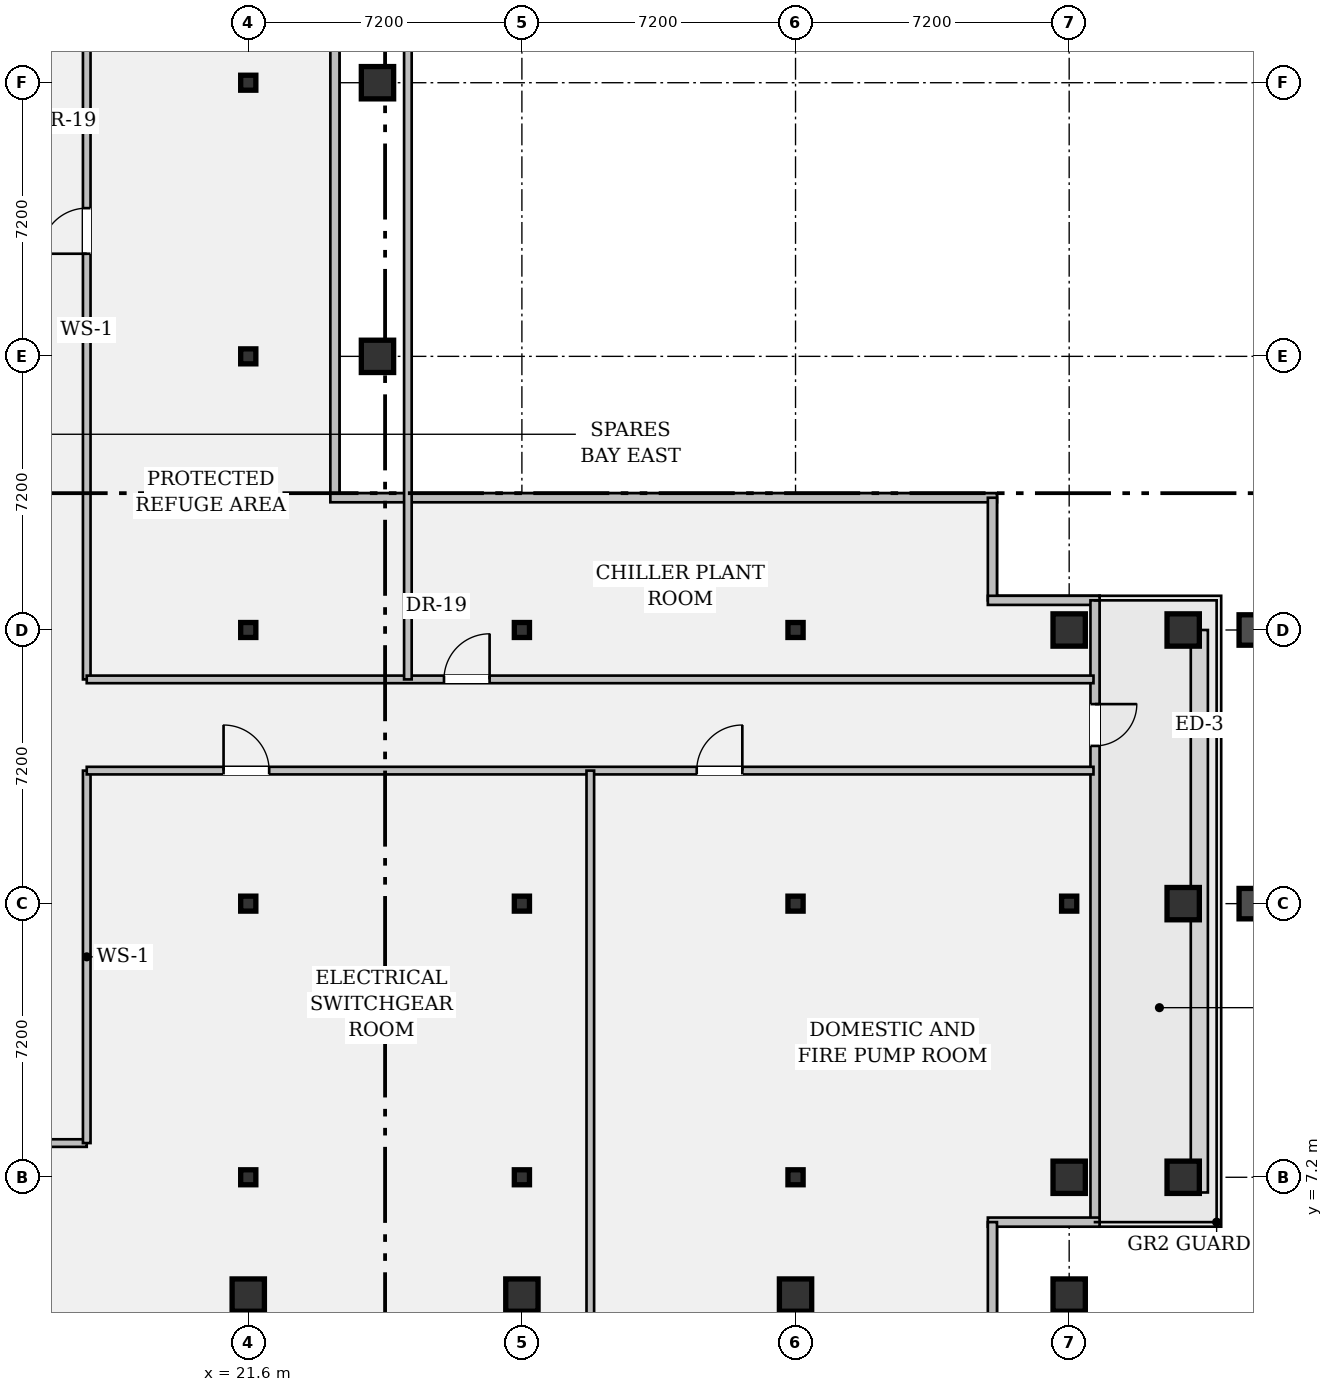
"""IFC4 building model, lengths in metres.
Left out: names, types, materials, properties, quantities, classifications, styles, units other than length and angle.
Written with IfcOpenShell. Run it as: python <this file> out.ifc"""

import sys

from ifc_helpers import new_model, si_unit, direction, frame, frame_2d, origin, origin_2d, place, context, subcontext, project, spatial, rectangle, hollow_rectangle, i_section, extrude, element, fill, save


model = new_model("IFC4")
c1 = context("Model", 3, precision=1e-05, world=origin(), true_north=direction((0.0, 1.0)))
c2 = subcontext(c1, "Body", "Model", "MODEL_VIEW")
j1 = project(units=[si_unit("LENGTHUNIT", "METRE"), si_unit("PLANEANGLEUNIT", "RADIAN")], contexts=[c1])
p1 = place(None, origin())
s1 = spatial("IfcSite", under=j1, at=p1, CompositionType="ELEMENT")
p2 = place(p1, origin())
s2 = spatial("IfcBuilding", under=s1, at=p2, CompositionType="ELEMENT")
p3 = place(p2, frame((0.0, 0.0, 163.8)))
s3 = spatial("IfcBuildingStorey", under=s2, at=p3, CompositionType="ELEMENT", Elevation=163.8)
p4 = place(p3, frame((21.6, 4.1, 0.0), z_axis=(0.0, 0.0, 1.0), x_axis=(1.0, 0.0, 0.0)))
e1 = element("IfcColumn", 1, at=p4, inside=s3, PredefinedType="COLUMN", context=c2, shape_type="SweptSolid", body=[
    extrude(hollow_rectangle(XDim=0.85, YDim=0.85, WallThickness=0.05, at=origin_2d()), origin(), (0.0, 0.0, 1.0), 4.6),
])
for number, where, z_axis, x_axis in (
    (2, (21.6, 7.2, 0.0), (0.0, 0.0, 1.0), (1.0, 0.0, 0.0)),
    (3, (21.6, 14.4, 0.0), (0.0, 0.0, 1.0), (1.0, 0.0, 0.0)),
    (4, (21.6, 21.6, 0.0), (0.0, 0.0, 1.0), (1.0, 0.0, 0.0)),
    (5, (21.6, 28.8, 0.0), (0.0, 0.0, 1.0), (1.0, 0.0, 0.0)),
    (6, (21.6, 36.0, 0.0), (0.0, 0.0, 1.0), (1.0, 0.0, 0.0)),
):
    element("IfcColumn", number, at=place(p3, frame(where, z_axis=z_axis, x_axis=x_axis)), inside=s3, PredefinedType="COLUMN", context=c2, shape_type="SweptSolid", body=[
        extrude(i_section(OverallWidth=0.399, OverallDepth=0.394, WebThickness=0.023, FlangeThickness=0.037, FilletRadius=0.018, at=origin_2d()), origin(), (0.0, 0.0, 1.0), 4.6),
    ])
for number, where, z_axis, x_axis in (
    (7, (25.0, 28.8, 0.0), (0.0, 0.0, 1.0), (1.0, 0.0, 0.0)),
    (8, (25.0, 36.0, 0.0), (0.0, 0.0, 1.0), (1.0, 0.0, 0.0)),
    (9, (28.8, 4.1, 0.0), (0.0, 0.0, 1.0), (1.0, 0.0, 0.0)),
):
    element("IfcColumn", number, at=place(p3, frame(where, z_axis=z_axis, x_axis=x_axis)), inside=s3, PredefinedType="COLUMN", context=c2, shape_type="SweptSolid", body=[
        extrude(hollow_rectangle(XDim=0.85, YDim=0.85, WallThickness=0.05, at=origin_2d()), origin(), (0.0, 0.0, 1.0), 4.6),
    ])
for number, where, z_axis, x_axis in (
    (10, (28.8, 7.2, 0.0), (0.0, 0.0, 1.0), (1.0, 0.0, 0.0)),
    (11, (28.8, 14.4, 0.0), (0.0, 0.0, 1.0), (1.0, 0.0, 0.0)),
    (12, (28.8, 21.6, 0.0), (0.0, 0.0, 1.0), (1.0, 0.0, 0.0)),
):
    element("IfcColumn", number, at=place(p3, frame(where, z_axis=z_axis, x_axis=x_axis)), inside=s3, PredefinedType="COLUMN", context=c2, shape_type="SweptSolid", body=[
        extrude(i_section(OverallWidth=0.399, OverallDepth=0.394, WebThickness=0.023, FlangeThickness=0.037, FilletRadius=0.018, at=origin_2d()), origin(), (0.0, 0.0, 1.0), 4.6),
    ])
p5 = place(p3, frame((36.0, 4.1, 0.0), z_axis=(0.0, 0.0, 1.0), x_axis=(1.0, 0.0, 0.0)))
e13 = element("IfcColumn", 13, at=p5, inside=s3, PredefinedType="COLUMN", context=c2, shape_type="SweptSolid", body=[
    extrude(hollow_rectangle(XDim=0.85, YDim=0.85, WallThickness=0.05, at=origin_2d()), origin(), (0.0, 0.0, 1.0), 4.6),
])
for number, where, z_axis, x_axis in (
    (14, (36.0, 7.2, 0.0), (0.0, 0.0, 1.0), (1.0, 0.0, 0.0)),
    (15, (36.0, 14.4, 0.0), (0.0, 0.0, 1.0), (1.0, 0.0, 0.0)),
    (16, (36.0, 21.6, 0.0), (0.0, 0.0, 1.0), (1.0, 0.0, 0.0)),
):
    element("IfcColumn", number, at=place(p3, frame(where, z_axis=z_axis, x_axis=x_axis)), inside=s3, PredefinedType="COLUMN", context=c2, shape_type="SweptSolid", body=[
        extrude(i_section(OverallWidth=0.399, OverallDepth=0.394, WebThickness=0.023, FlangeThickness=0.037, FilletRadius=0.018, at=origin_2d()), origin(), (0.0, 0.0, 1.0), 4.6),
    ])
for number, where, z_axis, x_axis in (
    (17, (43.2, 4.1, 0.0), (0.0, 0.0, 1.0), (1.0, 0.0, 0.0)),
    (18, (43.2, 7.2, 0.0), (0.0, 0.0, 1.0), (1.0, 0.0, 0.0)),
):
    element("IfcColumn", number, at=place(p3, frame(where, z_axis=z_axis, x_axis=x_axis)), inside=s3, PredefinedType="COLUMN", context=c2, shape_type="SweptSolid", body=[
        extrude(hollow_rectangle(XDim=0.85, YDim=0.85, WallThickness=0.05, at=origin_2d()), origin(), (0.0, 0.0, 1.0), 4.6),
    ])
p6 = place(p3, frame((43.2, 14.4, 0.0), z_axis=(0.0, 0.0, 1.0), x_axis=(1.0, 0.0, 0.0)))
e19 = element("IfcColumn", 19, at=p6, inside=s3, PredefinedType="COLUMN", context=c2, shape_type="SweptSolid", body=[
    extrude(i_section(OverallWidth=0.399, OverallDepth=0.394, WebThickness=0.023, FlangeThickness=0.037, FilletRadius=0.018, at=origin_2d()), origin(), (0.0, 0.0, 1.0), 4.6),
])
for number, where, z_axis, x_axis in (
    (20, (43.2, 21.6, 0.0), (0.0, 0.0, 1.0), (1.0, 0.0, 0.0)),
    (21, (46.2, 7.2, 0.0), (0.0, 0.0, 1.0), (1.0, 0.0, 0.0)),
    (22, (46.2, 14.4, 0.0), (0.0, 0.0, 1.0), (1.0, 0.0, 0.0)),
    (23, (46.2, 21.6, 0.0), (0.0, 0.0, 1.0), (1.0, 0.0, 0.0)),
):
    element("IfcColumn", number, at=place(p3, frame(where, z_axis=z_axis, x_axis=x_axis)), inside=s3, PredefinedType="COLUMN", context=c2, shape_type="SweptSolid", body=[
        extrude(hollow_rectangle(XDim=0.85, YDim=0.85, WallThickness=0.05, at=origin_2d()), origin(), (0.0, 0.0, 1.0), 4.6),
    ])
for number, where, z_axis, x_axis in (
    (24, (48.07, 14.4, -0.265), (0.209, 0.0, 0.978), (0.0, 1.0, 0.0)),
    (25, (48.07, 21.6, -0.265), (0.209, 0.0, 0.978), (0.0, 1.0, 0.0)),
):
    element("IfcColumn", number, at=place(p3, frame(where, z_axis=z_axis, x_axis=x_axis)), inside=s3, PredefinedType="COLUMN", context=c2, shape_type="SweptSolid", body=[
        extrude(hollow_rectangle(XDim=0.8, YDim=0.8, WallThickness=0.05, at=origin_2d()), origin(), (0.0, 0.0, 1.0), 3.497),
    ])
p7 = place(p3, frame((23.88, 37.18, 0.0), z_axis=(0.0, 0.0, 1.0), x_axis=(0.0, -1.0, 0.0)))
e26 = element("IfcWall", 26, at=p7, inside=s3, PredefinedType="STANDARD", context=c2, shape_type="SweptSolid", body=[
    extrude(rectangle(XDim=12.1, YDim=0.24, at=frame_2d((6.05, 0.0))), origin(), (0.0, 0.0, 1.0), 3.185),
])
p8 = place(p3, frame((23.76, 25.08, 0.0), z_axis=(0.0, 0.0, 1.0), x_axis=(1.0, 0.0, 0.0)))
e27 = element("IfcWall", 27, at=p8, inside=s3, PredefinedType="STANDARD", context=c2, shape_type="SweptSolid", body=[
    extrude(rectangle(XDim=17.54, YDim=0.24, at=frame_2d((8.77, 0.0))), origin(), (0.0, 0.0, 1.0), 4.6),
])
p9 = place(p3, frame((41.18, 25.08, 0.0), z_axis=(0.0, 0.0, 1.0), x_axis=(0.0, -1.0, 0.0)))
e28 = element("IfcWall", 28, at=p9, inside=s3, PredefinedType="STANDARD", context=c2, shape_type="SweptSolid", body=[
    extrude(rectangle(XDim=2.7, YDim=0.24, at=frame_2d((1.35, 0.0))), origin(), (0.0, 0.0, 1.0), 4.6),
])
p10 = place(p3, frame((41.06, 22.38, 0.0), z_axis=(0.0, 0.0, 1.0), x_axis=(1.0, 0.0, 0.0)))
e29 = element("IfcWall", 29, at=p10, inside=s3, PredefinedType="STANDARD", context=c2, shape_type="SweptSolid", body=[
    extrude(rectangle(XDim=2.94, YDim=0.24, at=frame_2d((1.47, 0.0))), origin(), (0.0, 0.0, 1.0), 4.6),
])
p11 = place(p3, frame((43.88, 22.38, 0.0), z_axis=(0.0, 0.0, 1.0), x_axis=(0.0, -1.0, 0.0)))
e30 = element("IfcWall", 30, at=p11, inside=s3, PredefinedType="STANDARD", context=c2, shape_type="SweptSolid", body=[
    extrude(rectangle(XDim=16.36, YDim=0.24, at=frame_2d((8.18, 0.0))), origin(), (0.0, 0.0, 1.0), 3.135),
])
p12 = place(p11, frame((2.73, 0.0, 0.0)))
e31 = element("IfcOpeningElement", 31, at=p12, cuts=e30, PredefinedType="OPENING", context=c2, shape_type="SweptSolid", body=[
    extrude(rectangle(XDim=1.1, YDim=2.15, at=frame_2d((0.55, 1.075))), frame((0.0, 0.132, 0.0), z_axis=(0.0, -1.0, 0.0), x_axis=(1.0, 0.0, 0.0)), (0.0, 0.0, 1.0), 0.264),
])
p13 = place(p3, frame((44.0, 6.02, 0.0), z_axis=(0.0, 0.0, 1.0), x_axis=(-1.0, 0.0, 0.0)))
e32 = element("IfcWall", 32, at=p13, inside=s3, PredefinedType="STANDARD", context=c2, shape_type="SweptSolid", body=[
    extrude(rectangle(XDim=2.94, YDim=0.24, at=frame_2d((1.47, 0.0))), origin(), (0.0, 0.0, 1.0), 4.6),
])
p14 = place(p3, frame((41.18, 6.02, 0.0), z_axis=(0.0, 0.0, 1.0), x_axis=(0.0, -1.0, 0.0)))
e33 = element("IfcWall", 33, at=p14, inside=s3, PredefinedType="STANDARD", context=c2, shape_type="SweptSolid", body=[
    extrude(rectangle(XDim=2.7, YDim=0.24, at=frame_2d((1.35, 0.0))), origin(), (0.0, 0.0, 1.0), 4.6),
])
p15 = place(p3, frame((14.4, 8.1, 0.0), z_axis=(0.0, 0.0, 1.0), x_axis=(1.0, 0.0, 0.0)))
e34 = element("IfcWall", 34, at=p15, inside=s3, PredefinedType="PARTITIONING", context=c2, shape_type="SweptSolid", body=[
    extrude(rectangle(XDim=2.95, YDim=0.2, at=frame_2d((1.475, 0.0))), origin(), (0.0, 0.0, 1.0), 4.168),
])
p16 = place(p15, frame((0.9, 0.0, 0.0)))
e35 = element("IfcOpeningElement", 35, at=p16, cuts=e34, PredefinedType="OPENING", context=c2, shape_type="SweptSolid", body=[
    extrude(rectangle(XDim=1.0, YDim=2.15, at=frame_2d((0.5, 1.075))), frame((0.0, 0.112, 0.0), z_axis=(0.0, -1.0, 0.0), x_axis=(1.0, 0.0, 0.0)), (0.0, 0.0, 1.0), 0.224),
])
p17 = place(p3, frame((17.35, 8.1, 0.0), z_axis=(0.0, 0.0, 1.0), x_axis=(0.0, 1.0, 0.0)))
e36 = element("IfcWall", 36, at=p17, inside=s3, PredefinedType="PARTITIONING", context=c2, shape_type="SweptSolid", body=[
    extrude(rectangle(XDim=9.8, YDim=0.2, at=frame_2d((4.9, 0.0))), origin(), (0.0, 0.0, 1.0), 3.963),
])
p18 = place(p3, frame((17.35, 20.3, 0.0), z_axis=(0.0, 0.0, 1.0), x_axis=(0.0, 1.0, 0.0)))
e37 = element("IfcWall", 37, at=p18, inside=s3, PredefinedType="PARTITIONING", context=c2, shape_type="SweptSolid", body=[
    extrude(rectangle(XDim=19.58, YDim=0.2, at=frame_2d((9.79, 0.0))), origin(), (0.0, 0.0, 1.0), 3.963),
])
p19 = place(p18, frame((11.2, 0.0, 0.0)))
e38 = element("IfcOpeningElement", 38, at=p19, cuts=e37, PredefinedType="OPENING", context=c2, shape_type="SweptSolid", body=[
    extrude(rectangle(XDim=1.2, YDim=2.15, at=frame_2d((0.6, 1.075))), frame((0.0, 0.112, 0.0), z_axis=(0.0, -1.0, 0.0), x_axis=(1.0, 0.0, 0.0)), (0.0, 0.0, 1.0), 0.224),
])
p20 = place(p3, frame((17.35, 17.9, 0.0), z_axis=(0.0, 0.0, 1.0), x_axis=(1.0, 0.0, 0.0)))
e39 = element("IfcWall", 39, at=p20, inside=s3, PredefinedType="PARTITIONING", context=c2, shape_type="SweptSolid", body=[
    extrude(rectangle(XDim=26.49, YDim=0.2, at=frame_2d((13.245, 0.0))), origin(), (0.0, 0.0, 1.0), 3.963),
])
p21 = place(p20, frame((3.6, 0.0, 0.0)))
e40 = element("IfcOpeningElement", 40, at=p21, cuts=e39, PredefinedType="OPENING", context=c2, shape_type="SweptSolid", body=[
    extrude(rectangle(XDim=1.2, YDim=2.15, at=frame_2d((0.6, 1.075))), frame((0.0, 0.112, 0.0), z_axis=(0.0, -1.0, 0.0), x_axis=(1.0, 0.0, 0.0)), (0.0, 0.0, 1.0), 0.224),
])
p22 = place(p20, frame((16.05, 0.0, 0.0)))
e41 = element("IfcOpeningElement", 41, at=p22, cuts=e39, PredefinedType="OPENING", context=c2, shape_type="SweptSolid", body=[
    extrude(rectangle(XDim=1.2, YDim=2.15, at=frame_2d((0.6, 1.075))), frame((0.0, 0.112, 0.0), z_axis=(0.0, -1.0, 0.0), x_axis=(1.0, 0.0, 0.0)), (0.0, 0.0, 1.0), 0.224),
])
p23 = place(p3, frame((17.35, 20.3, 0.0), z_axis=(0.0, 0.0, 1.0), x_axis=(1.0, 0.0, 0.0)))
e42 = element("IfcWall", 42, at=p23, inside=s3, PredefinedType="PARTITIONING", context=c2, shape_type="SweptSolid", body=[
    extrude(rectangle(XDim=26.49, YDim=0.2, at=frame_2d((13.245, 0.0))), origin(), (0.0, 0.0, 1.0), 3.963),
])
p24 = place(p23, frame((9.4, 0.0, 0.0)))
e43 = element("IfcOpeningElement", 43, at=p24, cuts=e42, PredefinedType="OPENING", context=c2, shape_type="SweptSolid", body=[
    extrude(rectangle(XDim=1.2, YDim=2.15, at=frame_2d((0.6, 1.075))), frame((0.0, 0.112, 0.0), z_axis=(0.0, -1.0, 0.0), x_axis=(1.0, 0.0, 0.0)), (0.0, 0.0, 1.0), 0.224),
])
p25 = place(p3, frame((30.6, 3.32, 0.0), z_axis=(0.0, 0.0, 1.0), x_axis=(0.0, 1.0, 0.0)))
e44 = element("IfcWall", 44, at=p25, inside=s3, PredefinedType="PARTITIONING", context=c2, shape_type="SweptSolid", body=[
    extrude(rectangle(XDim=14.58, YDim=0.2, at=frame_2d((7.29, 0.0))), origin(), (0.0, 0.0, 1.0), 3.963),
])
p26 = place(p3, frame((25.8, 20.3, 0.0), z_axis=(0.0, 0.0, 1.0), x_axis=(0.0, 1.0, 0.0)))
e45 = element("IfcWall", 45, at=p26, inside=s3, PredefinedType="PARTITIONING", context=c2, shape_type="SweptSolid", body=[
    extrude(rectangle(XDim=19.58, YDim=0.2, at=frame_2d((9.79, 0.0))), origin(), (0.0, 0.0, 1.0), 3.963),
])
p27 = place(p12, origin())
e46 = element("IfcDoor", 46, at=p27, inside=s3, OperationType="SINGLE_SWING_LEFT", PredefinedType="DOOR", context=c2, shape_type="SweptSolid", body=[
    extrude(rectangle(XDim=1.1, YDim=2.15, at=frame_2d((0.55, 1.075))), frame((0.0, 0.025, 0.0), z_axis=(0.0, -1.0, 0.0), x_axis=(1.0, 0.0, 0.0)), (0.0, 0.0, 1.0), 0.05),
])
fill(e31, e46)
p28 = place(p19, origin())
e47 = element("IfcDoor", 47, at=p28, inside=s3, OperationType="SINGLE_SWING_LEFT", PredefinedType="DOOR", context=c2, shape_type="SweptSolid", body=[
    extrude(rectangle(XDim=1.2, YDim=2.15, at=frame_2d((0.6, 1.075))), frame((0.0, 0.025, 0.0), z_axis=(0.0, -1.0, 0.0), x_axis=(1.0, 0.0, 0.0)), (0.0, 0.0, 1.0), 0.05),
])
fill(e38, e47)
p29 = place(p24, origin())
e48 = element("IfcDoor", 48, at=p29, inside=s3, OperationType="SINGLE_SWING_RIGHT", PredefinedType="DOOR", context=c2, shape_type="SweptSolid", body=[
    extrude(rectangle(XDim=1.2, YDim=2.15, at=frame_2d((0.6, 1.075))), frame((0.0, 0.025, 0.0), z_axis=(0.0, -1.0, 0.0), x_axis=(1.0, 0.0, 0.0)), (0.0, 0.0, 1.0), 0.05),
])
fill(e43, e48)
p30 = place(p21, origin())
e49 = element("IfcDoor", 49, at=p30, inside=s3, OperationType="SINGLE_SWING_LEFT", PredefinedType="DOOR", context=c2, shape_type="SweptSolid", body=[
    extrude(rectangle(XDim=1.2, YDim=2.15, at=frame_2d((0.6, 1.075))), frame((0.0, 0.025, 0.0), z_axis=(0.0, -1.0, 0.0), x_axis=(1.0, 0.0, 0.0)), (0.0, 0.0, 1.0), 0.05),
])
fill(e40, e49)
p31 = place(p22, origin())
e50 = element("IfcDoor", 50, at=p31, inside=s3, OperationType="SINGLE_SWING_RIGHT", PredefinedType="DOOR", context=c2, shape_type="SweptSolid", body=[
    extrude(rectangle(XDim=1.2, YDim=2.15, at=frame_2d((0.6, 1.075))), frame((0.0, 0.025, 0.0), z_axis=(0.0, -1.0, 0.0), x_axis=(1.0, 0.0, 0.0)), (0.0, 0.0, 1.0), 0.05),
])
fill(e41, e50)
save(model, sys.argv[1])
